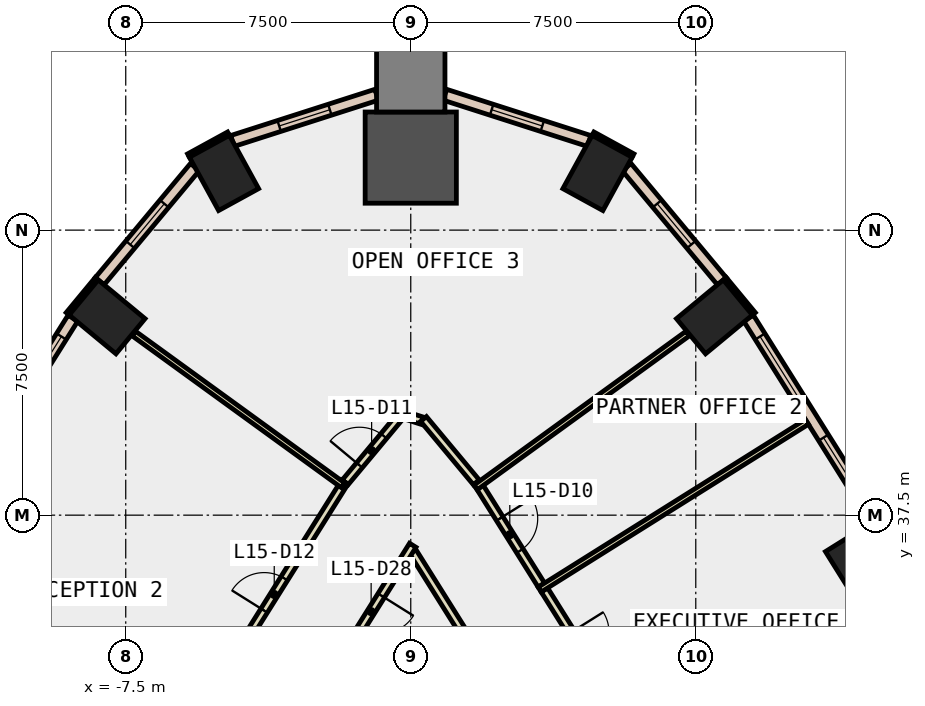
"""IFC4 building model, lengths in metres.
Left out: names, types, materials, properties, quantities, classifications, styles, units other than length and angle.
Written with IfcOpenShell. Run it as: python <this file> out.ifc"""

import sys

from ifc_helpers import new_model, si_unit, direction, frame, frame_2d, origin, origin_2d, place, context, subcontext, project, spatial, rectangle, extrude, element, fill, save


model = new_model("IFC4")
c1 = context("Model", 3, precision=1e-05, world=origin(), true_north=direction((0.0, 1.0)))
c2 = subcontext(c1, "Body", "Model", "MODEL_VIEW")
j1 = project(units=[si_unit("LENGTHUNIT", "METRE"), si_unit("PLANEANGLEUNIT", "RADIAN")], contexts=[c1])
p1 = place(None, origin())
s1 = spatial("IfcSite", under=j1, at=p1, CompositionType="ELEMENT")
p2 = place(p1, origin())
s2 = spatial("IfcBuilding", under=s1, at=p2, CompositionType="ELEMENT")
p3 = place(p2, frame((0.0, 0.0, 72.8)))
s3 = spatial("IfcBuildingStorey", under=s2, at=p3, CompositionType="ELEMENT", Elevation=72.8)
for number, where, z_axis, x_axis in (
    (1, (11.909, 36.457, -0.4), (0.0, 0.0, 1.0), (-0.53, 0.848, 0.0)),
    (2, (7.991, 42.718, -0.4), (0.0, 0.0, 1.0), (-0.638, 0.77, 0.0)),
    (3, (4.914, 46.505, -0.4), (0.0, 0.0, 1.0), (-0.877, 0.48, 0.0)),
):
    element("IfcColumn", number, at=place(p3, frame(where, z_axis=z_axis, x_axis=x_axis)), inside=s3, PredefinedType="COLUMN", context=c2, shape_type="SweptSolid", body=[
        extrude(rectangle(XDim=1.2, YDim=1.6, at=origin_2d()), origin(), (0.0, 0.0, 1.0), 4.2),
    ])
p4 = place(p3, frame((0.0, 46.908, -0.4), z_axis=(0.0, 0.0, 1.0), x_axis=(0.0, 1.0, 0.0)))
e4 = element("IfcColumn", 4, at=p4, inside=s3, PredefinedType="COLUMN", context=c2, shape_type="SweptSolid", body=[
    extrude(rectangle(XDim=2.4, YDim=2.4, at=origin_2d()), origin(), (0.0, 0.0, 1.0), 4.2),
])
for number, where, z_axis, x_axis in (
    (5, (-4.914, 46.505, -0.4), (0.0, 0.0, 1.0), (0.877, 0.48, 0.0)),
    (6, (-7.991, 42.718, -0.4), (0.0, 0.0, 1.0), (0.638, 0.77, 0.0)),
):
    element("IfcColumn", number, at=place(p3, frame(where, z_axis=z_axis, x_axis=x_axis)), inside=s3, PredefinedType="COLUMN", context=c2, shape_type="SweptSolid", body=[
        extrude(rectangle(XDim=1.2, YDim=1.6, at=origin_2d()), origin(), (0.0, 0.0, 1.0), 4.2),
    ])
p5 = place(p3, frame((0.0, 49.008, -0.4), z_axis=(0.0, 0.0, 1.0), x_axis=(0.0, 1.0, 0.0)))
e7 = element("IfcColumn", 7, at=p5, inside=s3, PredefinedType="COLUMN", context=c2, shape_type="SweptSolid", body=[
    extrude(rectangle(XDim=1.8, YDim=1.8, at=origin_2d()), origin(), (0.0, 0.0, 1.0), 4.2),
])
for number, where, z_axis, x_axis in (
    (8, (5.848, 46.962, 0.0), (0.0, 0.0, 1.0), (-0.877, 0.48, 0.0)),
    (9, (-4.796, 47.538, 0.0), (0.0, 0.0, 1.0), (-0.877, -0.48, 0.0)),
    (10, (9.028, 42.798, 0.0), (0.0, 0.0, 1.0), (-0.638, 0.77, 0.0)),
    (11, (-8.263, 43.722, 0.0), (0.0, 0.0, 1.0), (-0.638, -0.77, 0.0)),
):
    element("IfcWall", number, at=place(p3, frame(where, z_axis=z_axis, x_axis=x_axis)), inside=s3, PredefinedType="STANDARD", context=c2, shape_type="SweptSolid", body=[
        extrude(rectangle(XDim=1.199, YDim=0.1, at=frame_2d((0.6, 0.0))), origin(), (0.0, 0.0, 1.0), 3.8),
    ])
p6 = place(p3, frame((12.227, 37.362, 0.0), z_axis=(0.0, 0.0, 1.0), x_axis=(-0.531357111884, 0.847147932565, 0.0)))
e12 = element("IfcWall", 12, at=p6, inside=s3, PredefinedType="STANDARD", context=c2, shape_type="SweptSolid", body=[
    extrude(rectangle(XDim=6.282, YDim=0.3, at=frame_2d((3.141, 0.0))), origin(), (0.0, 0.0, 1.0), 3.8),
])
p7 = place(p6, frame((0.571, 0.0, 0.9)))
e13 = element("IfcOpeningElement", 13, at=p7, cuts=e12, PredefinedType="OPENING", context=c2, shape_type="SweptSolid", body=[
    extrude(rectangle(XDim=2.0, YDim=2.6, at=frame_2d((1.0, 1.3))), frame((0.0, 0.16, 0.0), z_axis=(0.0, -1.0, 0.0), x_axis=(1.0, 0.0, 0.0)), (0.0, 0.0, 1.0), 0.32),
])
p8 = place(p6, frame((3.712, 0.0, 0.9)))
e14 = element("IfcOpeningElement", 14, at=p8, cuts=e12, PredefinedType="OPENING", context=c2, shape_type="SweptSolid", body=[
    extrude(rectangle(XDim=2.0, YDim=2.6, at=frame_2d((1.0, 1.3))), frame((0.0, 0.16, 0.0), z_axis=(0.0, -1.0, 0.0), x_axis=(1.0, 0.0, 0.0)), (0.0, 0.0, 1.0), 0.32),
])
p9 = place(p3, frame((8.185, 43.656, 0.0), z_axis=(0.0, 0.0, 1.0), x_axis=(-0.640565172846, 0.767903808649, 0.0)))
e15 = element("IfcWall", 15, at=p9, inside=s3, PredefinedType="STANDARD", context=c2, shape_type="SweptSolid", body=[
    extrude(rectangle(XDim=3.909, YDim=0.3, at=frame_2d((1.955, 0.0))), origin(), (0.0, 0.0, 1.0), 3.8),
])
p10 = place(p9, frame((1.255, 0.0, 0.9)))
e16 = element("IfcOpeningElement", 16, at=p10, cuts=e15, PredefinedType="OPENING", context=c2, shape_type="SweptSolid", body=[
    extrude(rectangle(XDim=1.4, YDim=2.6, at=frame_2d((0.7, 1.3))), frame((0.0, 0.16, 0.0), z_axis=(0.0, -1.0, 0.0), x_axis=(1.0, 0.0, 0.0)), (0.0, 0.0, 1.0), 0.32),
])
p11 = place(p3, frame((4.692, 47.346, 0.0), z_axis=(0.0, 0.0, 1.0), x_axis=(-0.95225533311, 0.30530276868, 0.0)))
e17 = element("IfcWall", 17, at=p11, inside=s3, PredefinedType="STANDARD", context=c2, shape_type="SweptSolid", body=[
    extrude(rectangle(XDim=3.983, YDim=0.3, at=frame_2d((1.992, 0.0))), origin(), (0.0, 0.0, 1.0), 3.8),
])
p12 = place(p11, frame((1.292, 0.0, 0.9)))
e18 = element("IfcOpeningElement", 18, at=p12, cuts=e17, PredefinedType="OPENING", context=c2, shape_type="SweptSolid", body=[
    extrude(rectangle(XDim=1.4, YDim=2.6, at=frame_2d((0.7, 1.3))), frame((0.0, 0.16, 0.0), z_axis=(0.0, -1.0, 0.0), x_axis=(1.0, 0.0, 0.0)), (0.0, 0.0, 1.0), 0.32),
])
p13 = place(p3, frame((-0.899, 48.562, 0.0), z_axis=(0.0, 0.0, 1.0), x_axis=(-0.95225533311, -0.30530276868, 0.0)))
e19 = element("IfcWall", 19, at=p13, inside=s3, PredefinedType="STANDARD", context=c2, shape_type="SweptSolid", body=[
    extrude(rectangle(XDim=3.983, YDim=0.3, at=frame_2d((1.992, 0.0))), origin(), (0.0, 0.0, 1.0), 3.8),
])
p14 = place(p13, frame((1.292, 0.0, 0.9)))
e20 = element("IfcOpeningElement", 20, at=p14, cuts=e19, PredefinedType="OPENING", context=c2, shape_type="SweptSolid", body=[
    extrude(rectangle(XDim=1.4, YDim=2.6, at=frame_2d((0.7, 1.3))), frame((0.0, 0.16, 0.0), z_axis=(0.0, -1.0, 0.0), x_axis=(1.0, 0.0, 0.0)), (0.0, 0.0, 1.0), 0.32),
])
p15 = place(p3, frame((-5.681, 46.658, 0.0), z_axis=(0.0, 0.0, 1.0), x_axis=(-0.640565172846, -0.767903808649, 0.0)))
e21 = element("IfcWall", 21, at=p15, inside=s3, PredefinedType="STANDARD", context=c2, shape_type="SweptSolid", body=[
    extrude(rectangle(XDim=3.909, YDim=0.3, at=frame_2d((1.955, 0.0))), origin(), (0.0, 0.0, 1.0), 3.8),
])
p16 = place(p15, frame((1.255, 0.0, 0.9)))
e22 = element("IfcOpeningElement", 22, at=p16, cuts=e21, PredefinedType="OPENING", context=c2, shape_type="SweptSolid", body=[
    extrude(rectangle(XDim=1.4, YDim=2.6, at=frame_2d((0.7, 1.3))), frame((0.0, 0.16, 0.0), z_axis=(0.0, -1.0, 0.0), x_axis=(1.0, 0.0, 0.0)), (0.0, 0.0, 1.0), 0.32),
])
p17 = place(p3, frame((-8.889, 42.684, 0.0), z_axis=(0.0, 0.0, 1.0), x_axis=(-0.531357111884, -0.847147932565, 0.0)))
e23 = element("IfcWall", 23, at=p17, inside=s3, PredefinedType="STANDARD", context=c2, shape_type="SweptSolid", body=[
    extrude(rectangle(XDim=6.282, YDim=0.3, at=frame_2d((3.141, 0.0))), origin(), (0.0, 0.0, 1.0), 3.8),
])
p18 = place(p17, frame((0.571, 0.0, 0.9)))
e24 = element("IfcOpeningElement", 24, at=p18, cuts=e23, PredefinedType="OPENING", context=c2, shape_type="SweptSolid", body=[
    extrude(rectangle(XDim=2.0, YDim=2.6, at=frame_2d((1.0, 1.3))), frame((0.0, 0.16, 0.0), z_axis=(0.0, -1.0, 0.0), x_axis=(1.0, 0.0, 0.0)), (0.0, 0.0, 1.0), 0.32),
])
p19 = place(p17, frame((3.712, 0.0, 0.9)))
e25 = element("IfcOpeningElement", 25, at=p19, cuts=e23, PredefinedType="OPENING", context=c2, shape_type="SweptSolid", body=[
    extrude(rectangle(XDim=2.0, YDim=2.6, at=frame_2d((1.0, 1.3))), frame((0.0, 0.16, 0.0), z_axis=(0.0, -1.0, 0.0), x_axis=(1.0, 0.0, 0.0)), (0.0, 0.0, 1.0), 0.32),
])
p20 = place(p3, frame((2.031, 33.385, 0.0), z_axis=(0.0, 0.0, 1.0), x_axis=(-0.53130100335, 0.847183122967, 0.0)))
e26 = element("IfcWall", 26, at=p20, inside=s3, PredefinedType="PARTITIONING", context=c2, shape_type="SweptSolid", body=[
    extrude(rectangle(XDim=3.723, YDim=0.2, at=frame_2d((1.861, 0.0))), origin(), (0.0, 0.0, 1.0), 3.8),
])
p21 = place(p3, frame((0.053, 36.708, 0.0), z_axis=(0.0, 0.0, 1.0), x_axis=(-0.53130190932, -0.847182554797, 0.0)))
e27 = element("IfcWall", 27, at=p21, inside=s3, PredefinedType="PARTITIONING", context=c2, shape_type="SweptSolid", body=[
    extrude(rectangle(XDim=3.922, YDim=0.2, at=frame_2d((1.961, 0.0))), origin(), (0.0, 0.0, 1.0), 3.8),
])
p22 = place(p21, frame((1.562, 0.0, 0.0)))
e28 = element("IfcOpeningElement", 28, at=p22, cuts=e27, PredefinedType="OPENING", context=c2, shape_type="SweptSolid", body=[
    extrude(rectangle(XDim=1.0, YDim=2.1, at=frame_2d((0.5, 1.05))), frame((0.0, 0.11, 0.0), z_axis=(0.0, -1.0, 0.0), x_axis=(1.0, 0.0, 0.0)), (0.0, 0.0, 1.0), 0.22),
])
p23 = place(p3, frame((3.517, 35.533, 0.0), z_axis=(0.0, 0.0, 1.0), x_axis=(0.531301282969, -0.847182947607, 0.0)))
e29 = element("IfcWall", 29, at=p23, inside=s3, PredefinedType="PARTITIONING", context=c2, shape_type="SweptSolid", body=[
    extrude(rectangle(XDim=3.638, YDim=0.2, at=frame_2d((1.819, 0.0))), origin(), (0.0, 0.0, 1.0), 3.8),
])
p24 = place(p23, frame((1.319, 0.0, 0.0)))
e30 = element("IfcOpeningElement", 30, at=p24, cuts=e29, PredefinedType="OPENING", context=c2, shape_type="SweptSolid", body=[
    extrude(rectangle(XDim=1.0, YDim=2.1, at=frame_2d((0.5, 1.05))), frame((0.0, 0.11, 0.0), z_axis=(0.0, -1.0, 0.0), x_axis=(1.0, 0.0, 0.0)), (0.0, 0.0, 1.0), 0.22),
])
p25 = place(p3, frame((1.775, 38.31, 0.0), z_axis=(0.0, 0.0, 1.0), x_axis=(0.531324164807, -0.847168597088, 0.0)))
e31 = element("IfcWall", 31, at=p25, inside=s3, PredefinedType="PARTITIONING", context=c2, shape_type="SweptSolid", body=[
    extrude(rectangle(XDim=3.128, YDim=0.2, at=frame_2d((1.564, 0.0))), origin(), (0.0, 0.0, 1.0), 3.8),
])
p26 = place(p25, frame((1.064, 0.0, 0.0)))
e32 = element("IfcOpeningElement", 32, at=p26, cuts=e31, PredefinedType="OPENING", context=c2, shape_type="SweptSolid", body=[
    extrude(rectangle(XDim=1.0, YDim=2.1, at=frame_2d((0.5, 1.05))), frame((0.0, 0.11, 0.0), z_axis=(0.0, -1.0, 0.0), x_axis=(1.0, 0.0, 0.0)), (0.0, 0.0, 1.0), 0.22),
])
p27 = place(p3, frame((-1.724, 38.365, 0.0), z_axis=(0.0, 0.0, 1.0), x_axis=(0.64036162185, 0.768073559799, 0.0)))
e33 = element("IfcWall", 33, at=p27, inside=s3, PredefinedType="PARTITIONING", context=c2, shape_type="SweptSolid", body=[
    extrude(rectangle(XDim=2.168, YDim=0.2, at=frame_2d((1.084, 0.0))), origin(), (0.0, 0.0, 1.0), 3.8),
])
p28 = place(p27, frame((0.584, 0.0, 0.0)))
e34 = element("IfcOpeningElement", 34, at=p28, cuts=e33, PredefinedType="OPENING", context=c2, shape_type="SweptSolid", body=[
    extrude(rectangle(XDim=1.0, YDim=2.1, at=frame_2d((0.5, 1.05))), frame((0.0, 0.11, 0.0), z_axis=(0.0, -1.0, 0.0), x_axis=(1.0, 0.0, 0.0)), (0.0, 0.0, 1.0), 0.22),
])
p29 = place(p3, frame((-0.095, 40.112, 0.0), z_axis=(0.0, 0.0, 1.0), x_axis=(0.952282288042, -0.305218682065, 0.0)))
e35 = element("IfcWall", 35, at=p29, inside=s3, PredefinedType="PARTITIONING", context=c2, shape_type="SweptSolid", body=[
    extrude(rectangle(XDim=0.42, YDim=0.2, at=frame_2d((0.21, 0.0))), origin(), (0.0, 0.0, 1.0), 3.8),
])
p30 = place(p3, frame((0.336, 40.03, 0.0), z_axis=(0.0, 0.0, 1.0), x_axis=(0.64036162185, -0.768073559799, 0.0)))
e36 = element("IfcWall", 36, at=p30, inside=s3, PredefinedType="PARTITIONING", context=c2, shape_type="SweptSolid", body=[
    extrude(rectangle(XDim=2.168, YDim=0.2, at=frame_2d((1.084, 0.0))), origin(), (0.0, 0.0, 1.0), 3.8),
])
p31 = place(p3, frame((-5.45, 32.451, 0.0), z_axis=(0.0, 0.0, 1.0), x_axis=(0.531388870359, 0.847128011849, 0.0)))
e37 = element("IfcWall", 37, at=p31, inside=s3, PredefinedType="PARTITIONING", context=c2, shape_type="SweptSolid", body=[
    extrude(rectangle(XDim=6.991, YDim=0.2, at=frame_2d((3.495, 0.0))), origin(), (0.0, 0.0, 1.0), 3.8),
])
p32 = place(p31, frame((2.996, 0.0, 0.0)))
e38 = element("IfcOpeningElement", 38, at=p32, cuts=e37, PredefinedType="OPENING", context=c2, shape_type="SweptSolid", body=[
    extrude(rectangle(XDim=1.0, YDim=2.1, at=frame_2d((0.5, 1.05))), frame((0.0, 0.11, 0.0), z_axis=(0.0, -1.0, 0.0), x_axis=(1.0, 0.0, 0.0)), (0.0, 0.0, 1.0), 0.22),
])
p33 = place(p3, frame((3.393, 35.543, 0.0), z_axis=(0.0, 0.0, 1.0), x_axis=(0.847089858839, 0.531449688166, 0.0)))
e39 = element("IfcWall", 39, at=p33, inside=s3, PredefinedType="PARTITIONING", context=c2, shape_type="SweptSolid", body=[
    extrude(rectangle(XDim=8.3, YDim=0.15, at=frame_2d((4.15, 0.0))), origin(), (0.0, 0.0, 1.0), 3.8),
])
p34 = place(p3, frame((1.708, 38.23, 0.0), z_axis=(0.0, 0.0, 1.0), x_axis=(0.809349578957, 0.58732721633, 0.0)))
e40 = element("IfcWall", 40, at=p34, inside=s3, PredefinedType="PARTITIONING", context=c2, shape_type="SweptSolid", body=[
    extrude(rectangle(XDim=6.896, YDim=0.15, at=frame_2d((3.448, 0.0))), origin(), (0.0, 0.0, 1.0), 3.8),
])
p35 = place(p3, frame((-1.788, 38.289, 0.0), z_axis=(0.0, 0.0, 1.0), x_axis=(-0.809417495555, 0.587233614408, 0.0)))
e41 = element("IfcWall", 41, at=p35, inside=s3, PredefinedType="PARTITIONING", context=c2, shape_type="SweptSolid", body=[
    extrude(rectangle(XDim=6.796, YDim=0.15, at=frame_2d((3.398, 0.0))), origin(), (0.0, 0.0, 1.0), 3.8),
])
p36 = place(p7, origin())
e42 = element("IfcWindow", 42, at=p36, inside=s3, PartitioningType="SINGLE_PANEL", PredefinedType="WINDOW", context=c2, shape_type="SweptSolid", body=[
    extrude(rectangle(XDim=2.0, YDim=2.6, at=frame_2d((1.0, 1.3))), frame((0.0, 0.03, 0.0), z_axis=(0.0, -1.0, 0.0), x_axis=(1.0, 0.0, 0.0)), (0.0, 0.0, 1.0), 0.06),
])
fill(e13, e42)
p37 = place(p8, origin())
e43 = element("IfcWindow", 43, at=p37, inside=s3, PartitioningType="SINGLE_PANEL", PredefinedType="WINDOW", context=c2, shape_type="SweptSolid", body=[
    extrude(rectangle(XDim=2.0, YDim=2.6, at=frame_2d((1.0, 1.3))), frame((0.0, 0.03, 0.0), z_axis=(0.0, -1.0, 0.0), x_axis=(1.0, 0.0, 0.0)), (0.0, 0.0, 1.0), 0.06),
])
fill(e14, e43)
p38 = place(p10, origin())
e44 = element("IfcWindow", 44, at=p38, inside=s3, PartitioningType="SINGLE_PANEL", PredefinedType="WINDOW", context=c2, shape_type="SweptSolid", body=[
    extrude(rectangle(XDim=1.4, YDim=2.6, at=frame_2d((0.7, 1.3))), frame((0.0, 0.03, 0.0), z_axis=(0.0, -1.0, 0.0), x_axis=(1.0, 0.0, 0.0)), (0.0, 0.0, 1.0), 0.06),
])
fill(e16, e44)
p39 = place(p12, origin())
e45 = element("IfcWindow", 45, at=p39, inside=s3, PartitioningType="SINGLE_PANEL", PredefinedType="WINDOW", context=c2, shape_type="SweptSolid", body=[
    extrude(rectangle(XDim=1.4, YDim=2.6, at=frame_2d((0.7, 1.3))), frame((0.0, 0.03, 0.0), z_axis=(0.0, -1.0, 0.0), x_axis=(1.0, 0.0, 0.0)), (0.0, 0.0, 1.0), 0.06),
])
fill(e18, e45)
p40 = place(p14, origin())
e46 = element("IfcWindow", 46, at=p40, inside=s3, PartitioningType="SINGLE_PANEL", PredefinedType="WINDOW", context=c2, shape_type="SweptSolid", body=[
    extrude(rectangle(XDim=1.4, YDim=2.6, at=frame_2d((0.7, 1.3))), frame((0.0, 0.03, 0.0), z_axis=(0.0, -1.0, 0.0), x_axis=(1.0, 0.0, 0.0)), (0.0, 0.0, 1.0), 0.06),
])
fill(e20, e46)
p41 = place(p16, origin())
e47 = element("IfcWindow", 47, at=p41, inside=s3, PartitioningType="SINGLE_PANEL", PredefinedType="WINDOW", context=c2, shape_type="SweptSolid", body=[
    extrude(rectangle(XDim=1.4, YDim=2.6, at=frame_2d((0.7, 1.3))), frame((0.0, 0.03, 0.0), z_axis=(0.0, -1.0, 0.0), x_axis=(1.0, 0.0, 0.0)), (0.0, 0.0, 1.0), 0.06),
])
fill(e22, e47)
p42 = place(p18, origin())
e48 = element("IfcWindow", 48, at=p42, inside=s3, PartitioningType="SINGLE_PANEL", PredefinedType="WINDOW", context=c2, shape_type="SweptSolid", body=[
    extrude(rectangle(XDim=2.0, YDim=2.6, at=frame_2d((1.0, 1.3))), frame((0.0, 0.03, 0.0), z_axis=(0.0, -1.0, 0.0), x_axis=(1.0, 0.0, 0.0)), (0.0, 0.0, 1.0), 0.06),
])
fill(e24, e48)
p43 = place(p26, origin())
e49 = element("IfcDoor", 49, at=p43, inside=s3, OperationType="SINGLE_SWING_LEFT", PredefinedType="DOOR", context=c2, shape_type="SweptSolid", body=[
    extrude(rectangle(XDim=1.0, YDim=2.1, at=frame_2d((0.5, 1.05))), frame((0.0, 0.025, 0.0), z_axis=(0.0, -1.0, 0.0), x_axis=(1.0, 0.0, 0.0)), (0.0, 0.0, 1.0), 0.05),
])
fill(e32, e49)
p44 = place(p28, origin())
e50 = element("IfcDoor", 50, at=p44, inside=s3, OperationType="SINGLE_SWING_LEFT", PredefinedType="DOOR", context=c2, shape_type="SweptSolid", body=[
    extrude(rectangle(XDim=1.0, YDim=2.1, at=frame_2d((0.5, 1.05))), frame((0.0, 0.025, 0.0), z_axis=(0.0, -1.0, 0.0), x_axis=(1.0, 0.0, 0.0)), (0.0, 0.0, 1.0), 0.05),
])
fill(e34, e50)
p45 = place(p32, origin())
e51 = element("IfcDoor", 51, at=p45, inside=s3, OperationType="SINGLE_SWING_LEFT", PredefinedType="DOOR", context=c2, shape_type="SweptSolid", body=[
    extrude(rectangle(XDim=1.0, YDim=2.1, at=frame_2d((0.5, 1.05))), frame((0.0, 0.025, 0.0), z_axis=(0.0, -1.0, 0.0), x_axis=(1.0, 0.0, 0.0)), (0.0, 0.0, 1.0), 0.05),
])
fill(e38, e51)
p46 = place(p22, origin())
e52 = element("IfcDoor", 52, at=p46, inside=s3, OperationType="SINGLE_SWING_LEFT", PredefinedType="DOOR", context=c2, shape_type="SweptSolid", body=[
    extrude(rectangle(XDim=1.0, YDim=2.1, at=frame_2d((0.5, 1.05))), frame((0.0, 0.025, 0.0), z_axis=(0.0, -1.0, 0.0), x_axis=(1.0, 0.0, 0.0)), (0.0, 0.0, 1.0), 0.05),
])
fill(e28, e52)
save(model, sys.argv[1])
